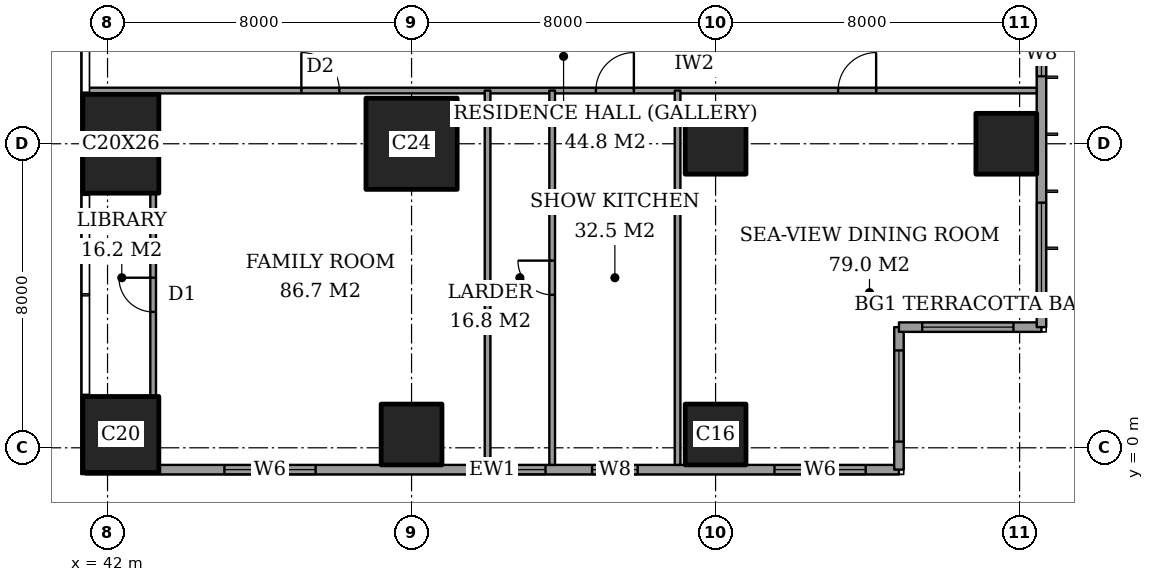
"""IFC4 building model, lengths in metres.
Left out: names, types, materials, properties, quantities, classifications, styles, units other than length and angle.
Written with IfcOpenShell. Run it as: python <this file> out.ifc"""

import sys

from ifc_helpers import new_model, si_unit, direction, frame, frame_2d, origin, origin_2d, place, context, subcontext, project, spatial, rectangle, extrude, element, fill, save


model = new_model("IFC4")
c1 = context("Model", 3, precision=1e-05, world=origin(), true_north=direction((0.0, 1.0)))
c2 = subcontext(c1, "Body", "Model", "MODEL_VIEW")
j1 = project(units=[si_unit("LENGTHUNIT", "METRE"), si_unit("PLANEANGLEUNIT", "RADIAN")], contexts=[c1])
p1 = place(None, origin())
s1 = spatial("IfcSite", under=j1, at=p1, CompositionType="ELEMENT")
p2 = place(p1, origin())
s2 = spatial("IfcBuilding", under=s1, at=p2, CompositionType="ELEMENT")
p3 = place(p2, frame((0.0, 0.0, 259.2)))
s3 = spatial("IfcBuildingStorey", under=s2, at=p3, CompositionType="ELEMENT", Elevation=259.2)
p4 = place(p3, frame((42.35, 0.35, 0.0), z_axis=(0.0, 0.0, 1.0), x_axis=(1.0, 0.0, 0.0)))
e1 = element("IfcColumn", 1, at=p4, inside=s3, PredefinedType="COLUMN", context=c2, shape_type="SweptSolid", body=[
    extrude(rectangle(XDim=2.0, YDim=2.0, at=origin_2d()), origin(), (0.0, 0.0, 1.0), 3.6),
])
p5 = place(p3, frame((42.35, 8.0, 0.0), z_axis=(0.0, 0.0, 1.0), x_axis=(1.0, 0.0, 0.0)))
e2 = element("IfcColumn", 2, at=p5, inside=s3, PredefinedType="COLUMN", context=c2, shape_type="SweptSolid", body=[
    extrude(rectangle(XDim=2.0, YDim=2.6, at=origin_2d()), origin(), (0.0, 0.0, 1.0), 3.6),
])
p6 = place(p3, frame((50.0, 0.35, 0.0), z_axis=(0.0, 0.0, 1.0), x_axis=(1.0, 0.0, 0.0)))
e3 = element("IfcColumn", 3, at=p6, inside=s3, PredefinedType="COLUMN", context=c2, shape_type="SweptSolid", body=[
    extrude(rectangle(XDim=1.6, YDim=1.6, at=origin_2d()), origin(), (0.0, 0.0, 1.0), 3.6),
])
p7 = place(p3, frame((50.0, 8.0, 0.0), z_axis=(0.0, 0.0, 1.0), x_axis=(1.0, 0.0, 0.0)))
e4 = element("IfcColumn", 4, at=p7, inside=s3, PredefinedType="COLUMN", context=c2, shape_type="SweptSolid", body=[
    extrude(rectangle(XDim=2.4, YDim=2.4, at=origin_2d()), origin(), (0.0, 0.0, 1.0), 3.6),
])
for number, where, z_axis, x_axis in (
    (5, (58.0, 0.35, 0.0), (0.0, 0.0, 1.0), (1.0, 0.0, 0.0)),
    (6, (58.0, 8.0, 0.0), (0.0, 0.0, 1.0), (1.0, 0.0, 0.0)),
    (7, (65.65, 8.0, 0.0), (0.0, 0.0, 1.0), (1.0, 0.0, 0.0)),
):
    element("IfcColumn", number, at=place(p3, frame(where, z_axis=z_axis, x_axis=x_axis)), inside=s3, PredefinedType="COLUMN", context=c2, shape_type="SweptSolid", body=[
        extrude(rectangle(XDim=1.6, YDim=1.6, at=origin_2d()), origin(), (0.0, 0.0, 1.0), 3.6),
    ])
p8 = place(p3, frame((41.425, -0.575, 0.0), z_axis=(0.0, 0.0, 1.0), x_axis=(1.0, 0.0, 0.0)))
e8 = element("IfcWall", 8, at=p8, inside=s3, PredefinedType="SOLIDWALL", context=c2, shape_type="SweptSolid", body=[
    extrude(rectangle(XDim=21.4, YDim=0.25, at=frame_2d((10.7, 0.0))), origin(), (0.0, 0.0, 1.0), 3.6),
])
p9 = place(p8, frame((3.65, 0.0, 0.6)))
e9 = element("IfcOpeningElement", 9, at=p9, cuts=e8, PredefinedType="OPENING", context=c2, shape_type="SweptSolid", body=[
    extrude(rectangle(XDim=2.4, YDim=2.0, at=frame_2d((1.2, 1.0))), frame((0.0, 0.135, 0.0), z_axis=(0.0, -1.0, 0.0), x_axis=(1.0, 0.0, 0.0)), (0.0, 0.0, 1.0), 0.27),
])
p10 = place(p8, frame((10.9, 0.0, 0.6)))
e10 = element("IfcOpeningElement", 10, at=p10, cuts=e8, PredefinedType="OPENING", context=c2, shape_type="SweptSolid", body=[
    extrude(rectangle(XDim=1.2, YDim=2.0, at=frame_2d((0.6, 1.0))), frame((0.0, 0.135, 0.0), z_axis=(0.0, -1.0, 0.0), x_axis=(1.0, 0.0, 0.0)), (0.0, 0.0, 1.0), 0.27),
])
p11 = place(p8, frame((13.325, 0.0, 0.6)))
e11 = element("IfcOpeningElement", 11, at=p11, cuts=e8, PredefinedType="OPENING", context=c2, shape_type="SweptSolid", body=[
    extrude(rectangle(XDim=1.2, YDim=2.0, at=frame_2d((0.6, 1.0))), frame((0.0, 0.135, 0.0), z_axis=(0.0, -1.0, 0.0), x_axis=(1.0, 0.0, 0.0)), (0.0, 0.0, 1.0), 0.27),
])
p12 = place(p8, frame((18.125, 0.0, 0.6)))
e12 = element("IfcOpeningElement", 12, at=p12, cuts=e8, PredefinedType="OPENING", context=c2, shape_type="SweptSolid", body=[
    extrude(rectangle(XDim=2.4, YDim=2.0, at=frame_2d((1.2, 1.0))), frame((0.0, 0.135, 0.0), z_axis=(0.0, -1.0, 0.0), x_axis=(1.0, 0.0, 0.0)), (0.0, 0.0, 1.0), 0.27),
])
p13 = place(p3, frame((62.825, -0.575, 0.0), z_axis=(0.0, 0.0, 1.0), x_axis=(0.0, 1.0, 0.0)))
e13 = element("IfcWall", 13, at=p13, inside=s3, PredefinedType="SOLIDWALL", context=c2, shape_type="SweptSolid", body=[
    extrude(rectangle(XDim=3.75, YDim=0.25, at=frame_2d((1.875, 0.0))), origin(), (0.0, 0.0, 1.0), 3.6),
])
p14 = place(p13, frame((0.738, 0.0, 0.6)))
e14 = element("IfcOpeningElement", 14, at=p14, cuts=e13, PredefinedType="OPENING", context=c2, shape_type="SweptSolid", body=[
    extrude(rectangle(XDim=2.4, YDim=2.0, at=frame_2d((1.2, 1.0))), frame((0.0, 0.135, 0.0), z_axis=(0.0, -1.0, 0.0), x_axis=(1.0, 0.0, 0.0)), (0.0, 0.0, 1.0), 0.27),
])
p15 = place(p3, frame((62.825, 3.175, 0.0), z_axis=(0.0, 0.0, 1.0), x_axis=(1.0, 0.0, 0.0)))
e15 = element("IfcWall", 15, at=p15, inside=s3, PredefinedType="SOLIDWALL", context=c2, shape_type="SweptSolid", body=[
    extrude(rectangle(XDim=3.75, YDim=0.25, at=frame_2d((1.875, 0.0))), origin(), (0.0, 0.0, 1.0), 3.6),
])
p16 = place(p15, frame((0.613, 0.0, 0.6)))
e16 = element("IfcOpeningElement", 16, at=p16, cuts=e15, PredefinedType="OPENING", context=c2, shape_type="SweptSolid", body=[
    extrude(rectangle(XDim=2.4, YDim=2.0, at=frame_2d((1.2, 1.0))), frame((0.0, 0.135, 0.0), z_axis=(0.0, -1.0, 0.0), x_axis=(1.0, 0.0, 0.0)), (0.0, 0.0, 1.0), 0.27),
])
p17 = place(p3, frame((66.575, 3.175, 0.0), z_axis=(0.0, 0.0, 1.0), x_axis=(0.0, 1.0, 0.0)))
e17 = element("IfcWall", 17, at=p17, inside=s3, PredefinedType="SOLIDWALL", context=c2, shape_type="SweptSolid", body=[
    extrude(rectangle(XDim=41.65, YDim=0.25, at=frame_2d((20.825, 0.0))), origin(), (0.0, 0.0, 1.0), 3.6),
])
p18 = place(p17, frame((0.875, 0.0, 0.6)))
e18 = element("IfcOpeningElement", 18, at=p18, cuts=e17, PredefinedType="OPENING", context=c2, shape_type="SweptSolid", body=[
    extrude(rectangle(XDim=2.4, YDim=2.0, at=frame_2d((1.2, 1.0))), frame((0.0, 0.135, 0.0), z_axis=(0.0, -1.0, 0.0), x_axis=(1.0, 0.0, 0.0)), (0.0, 0.0, 1.0), 0.27),
])
p19 = place(p17, frame((6.6, 0.0, 0.6)))
e19 = element("IfcOpeningElement", 19, at=p19, cuts=e17, PredefinedType="OPENING", context=c2, shape_type="SweptSolid", body=[
    extrude(rectangle(XDim=1.2, YDim=2.0, at=frame_2d((0.6, 1.0))), frame((0.0, 0.135, 0.0), z_axis=(0.0, -1.0, 0.0), x_axis=(1.0, 0.0, 0.0)), (0.0, 0.0, 1.0), 0.27),
])
p20 = place(p17, frame((8.825, 0.0, 0.6)))
e20 = element("IfcOpeningElement", 20, at=p20, cuts=e17, PredefinedType="OPENING", context=c2, shape_type="SweptSolid", body=[
    extrude(rectangle(XDim=2.4, YDim=2.0, at=frame_2d((1.2, 1.0))), frame((0.0, 0.135, 0.0), z_axis=(0.0, -1.0, 0.0), x_axis=(1.0, 0.0, 0.0)), (0.0, 0.0, 1.0), 0.27),
])
p21 = place(p17, frame((15.725, 0.0, 0.6)))
e21 = element("IfcOpeningElement", 21, at=p21, cuts=e17, PredefinedType="OPENING", context=c2, shape_type="SweptSolid", body=[
    extrude(rectangle(XDim=2.4, YDim=2.0, at=frame_2d((1.2, 1.0))), frame((0.0, 0.135, 0.0), z_axis=(0.0, -1.0, 0.0), x_axis=(1.0, 0.0, 0.0)), (0.0, 0.0, 1.0), 0.27),
])
p22 = place(p17, frame((23.625, 0.0, 0.6)))
e22 = element("IfcOpeningElement", 22, at=p22, cuts=e17, PredefinedType="OPENING", context=c2, shape_type="SweptSolid", body=[
    extrude(rectangle(XDim=2.4, YDim=2.0, at=frame_2d((1.2, 1.0))), frame((0.0, 0.135, 0.0), z_axis=(0.0, -1.0, 0.0), x_axis=(1.0, 0.0, 0.0)), (0.0, 0.0, 1.0), 0.27),
])
p23 = place(p17, frame((30.725, 0.0, 0.6)))
e23 = element("IfcOpeningElement", 23, at=p23, cuts=e17, PredefinedType="OPENING", context=c2, shape_type="SweptSolid", body=[
    extrude(rectangle(XDim=2.4, YDim=2.0, at=frame_2d((1.2, 1.0))), frame((0.0, 0.135, 0.0), z_axis=(0.0, -1.0, 0.0), x_axis=(1.0, 0.0, 0.0)), (0.0, 0.0, 1.0), 0.27),
])
p24 = place(p17, frame((34.525, 0.0, 0.6)))
e24 = element("IfcOpeningElement", 24, at=p24, cuts=e17, PredefinedType="OPENING", context=c2, shape_type="SweptSolid", body=[
    extrude(rectangle(XDim=1.2, YDim=2.0, at=frame_2d((0.6, 1.0))), frame((0.0, 0.135, 0.0), z_axis=(0.0, -1.0, 0.0), x_axis=(1.0, 0.0, 0.0)), (0.0, 0.0, 1.0), 0.27),
])
p25 = place(p17, frame((38.375, 0.0, 0.6)))
e25 = element("IfcOpeningElement", 25, at=p25, cuts=e17, PredefinedType="OPENING", context=c2, shape_type="SweptSolid", body=[
    extrude(rectangle(XDim=2.4, YDim=2.0, at=frame_2d((1.2, 1.0))), frame((0.0, 0.135, 0.0), z_axis=(0.0, -1.0, 0.0), x_axis=(1.0, 0.0, 0.0)), (0.0, 0.0, 1.0), 0.27),
])
p26 = place(p3, frame((41.439, 9.4, 0.0), z_axis=(0.0, 0.0, 1.0), x_axis=(1.0, 0.0, 0.0)))
e26 = element("IfcWall", 26, at=p26, inside=s3, PredefinedType="PARTITIONING", context=c2, shape_type="SweptSolid", body=[
    extrude(rectangle(XDim=25.011, YDim=0.15, at=frame_2d((12.505, 0.0))), origin(), (0.0, 0.0, 1.0), 3.35),
])
p27 = place(p26, frame((19.786, 0.0, 0.0)))
e27 = element("IfcOpeningElement", 27, at=p27, cuts=e26, PredefinedType="OPENING", context=c2, shape_type="SweptSolid", body=[
    extrude(rectangle(XDim=1.0, YDim=2.1, at=frame_2d((0.5, 1.05))), frame((0.0, 0.085, 0.0), z_axis=(0.0, -1.0, 0.0), x_axis=(1.0, 0.0, 0.0)), (0.0, 0.0, 1.0), 0.17),
])
p28 = place(p26, frame((13.411, 0.0, 0.0)))
e28 = element("IfcOpeningElement", 28, at=p28, cuts=e26, PredefinedType="OPENING", context=c2, shape_type="SweptSolid", body=[
    extrude(rectangle(XDim=1.0, YDim=2.1, at=frame_2d((0.5, 1.05))), frame((0.0, 0.085, 0.0), z_axis=(0.0, -1.0, 0.0), x_axis=(1.0, 0.0, 0.0)), (0.0, 0.0, 1.0), 0.17),
])
p29 = place(p26, frame((5.661, 0.0, 0.0)))
e29 = element("IfcOpeningElement", 29, at=p29, cuts=e26, PredefinedType="OPENING", context=c2, shape_type="SweptSolid", body=[
    extrude(rectangle(XDim=1.0, YDim=2.1, at=frame_2d((0.5, 1.05))), frame((0.0, 0.085, 0.0), z_axis=(0.0, -1.0, 0.0), x_axis=(1.0, 0.0, 0.0)), (0.0, 0.0, 1.0), 0.17),
])
p30 = place(p3, frame((43.2, 1.35, 0.0), z_axis=(0.0, 0.0, 1.0), x_axis=(0.0, 1.0, 0.0)))
e30 = element("IfcWall", 30, at=p30, inside=s3, PredefinedType="PARTITIONING", context=c2, shape_type="SweptSolid", body=[
    extrude(rectangle(XDim=5.35, YDim=0.15, at=frame_2d((2.675, 0.0))), origin(), (0.0, 0.0, 1.0), 3.35),
])
p31 = place(p30, frame((2.225, 0.0, 0.0)))
e31 = element("IfcOpeningElement", 31, at=p31, cuts=e30, PredefinedType="OPENING", context=c2, shape_type="SweptSolid", body=[
    extrude(rectangle(XDim=0.9, YDim=2.1, at=frame_2d((0.45, 1.05))), frame((0.0, 0.085, 0.0), z_axis=(0.0, -1.0, 0.0), x_axis=(1.0, 0.0, 0.0)), (0.0, 0.0, 1.0), 0.17),
])
p32 = place(p3, frame((52.0, -0.45, 0.0), z_axis=(0.0, 0.0, 1.0), x_axis=(0.0, 1.0, 0.0)))
e32 = element("IfcWall", 32, at=p32, inside=s3, PredefinedType="PARTITIONING", context=c2, shape_type="SweptSolid", body=[
    extrude(rectangle(XDim=9.85, YDim=0.15, at=frame_2d((4.925, 0.0))), origin(), (0.0, 0.0, 1.0), 3.35),
])
p33 = place(p3, frame((53.7, -0.45, 0.0), z_axis=(0.0, 0.0, 1.0), x_axis=(0.0, 1.0, 0.0)))
e33 = element("IfcWall", 33, at=p33, inside=s3, PredefinedType="PARTITIONING", context=c2, shape_type="SweptSolid", body=[
    extrude(rectangle(XDim=9.85, YDim=0.15, at=frame_2d((4.925, 0.0))), origin(), (0.0, 0.0, 1.0), 3.35),
])
p34 = place(p33, frame((4.475, 0.0, 0.0)))
e34 = element("IfcOpeningElement", 34, at=p34, cuts=e33, PredefinedType="OPENING", context=c2, shape_type="SweptSolid", body=[
    extrude(rectangle(XDim=0.9, YDim=2.1, at=frame_2d((0.45, 1.05))), frame((0.0, 0.085, 0.0), z_axis=(0.0, -1.0, 0.0), x_axis=(1.0, 0.0, 0.0)), (0.0, 0.0, 1.0), 0.17),
])
p35 = place(p3, frame((57.0, -0.45, 0.0), z_axis=(0.0, 0.0, 1.0), x_axis=(0.0, 1.0, 0.0)))
e35 = element("IfcWall", 35, at=p35, inside=s3, PredefinedType="PARTITIONING", context=c2, shape_type="SweptSolid", body=[
    extrude(rectangle(XDim=9.85, YDim=0.15, at=frame_2d((4.925, 0.0))), origin(), (0.0, 0.0, 1.0), 3.35),
])
p36 = place(p9, origin())
e36 = element("IfcWindow", 36, at=p36, inside=s3, PartitioningType="SINGLE_PANEL", PredefinedType="WINDOW", context=c2, shape_type="SweptSolid", body=[
    extrude(rectangle(XDim=2.4, YDim=2.0, at=frame_2d((1.2, 1.0))), frame((0.0, 0.03, 0.0), z_axis=(0.0, -1.0, 0.0), x_axis=(1.0, 0.0, 0.0)), (0.0, 0.0, 1.0), 0.06),
])
fill(e9, e36)
p37 = place(p10, origin())
e37 = element("IfcWindow", 37, at=p37, inside=s3, PartitioningType="SINGLE_PANEL", PredefinedType="WINDOW", context=c2, shape_type="SweptSolid", body=[
    extrude(rectangle(XDim=1.2, YDim=2.0, at=frame_2d((0.6, 1.0))), frame((0.0, 0.03, 0.0), z_axis=(0.0, -1.0, 0.0), x_axis=(1.0, 0.0, 0.0)), (0.0, 0.0, 1.0), 0.06),
])
fill(e10, e37)
p38 = place(p11, origin())
e38 = element("IfcWindow", 38, at=p38, inside=s3, PartitioningType="SINGLE_PANEL", PredefinedType="WINDOW", context=c2, shape_type="SweptSolid", body=[
    extrude(rectangle(XDim=1.2, YDim=2.0, at=frame_2d((0.6, 1.0))), frame((0.0, 0.03, 0.0), z_axis=(0.0, -1.0, 0.0), x_axis=(1.0, 0.0, 0.0)), (0.0, 0.0, 1.0), 0.06),
])
fill(e11, e38)
p39 = place(p12, origin())
e39 = element("IfcWindow", 39, at=p39, inside=s3, PartitioningType="SINGLE_PANEL", PredefinedType="WINDOW", context=c2, shape_type="SweptSolid", body=[
    extrude(rectangle(XDim=2.4, YDim=2.0, at=frame_2d((1.2, 1.0))), frame((0.0, 0.03, 0.0), z_axis=(0.0, -1.0, 0.0), x_axis=(1.0, 0.0, 0.0)), (0.0, 0.0, 1.0), 0.06),
])
fill(e12, e39)
p40 = place(p14, origin())
e40 = element("IfcWindow", 40, at=p40, inside=s3, PartitioningType="SINGLE_PANEL", PredefinedType="WINDOW", context=c2, shape_type="SweptSolid", body=[
    extrude(rectangle(XDim=2.4, YDim=2.0, at=frame_2d((1.2, 1.0))), frame((0.0, 0.03, 0.0), z_axis=(0.0, -1.0, 0.0), x_axis=(1.0, 0.0, 0.0)), (0.0, 0.0, 1.0), 0.06),
])
fill(e14, e40)
p41 = place(p16, origin())
e41 = element("IfcWindow", 41, at=p41, inside=s3, PartitioningType="SINGLE_PANEL", PredefinedType="WINDOW", context=c2, shape_type="SweptSolid", body=[
    extrude(rectangle(XDim=2.4, YDim=2.0, at=frame_2d((1.2, 1.0))), frame((0.0, 0.03, 0.0), z_axis=(0.0, -1.0, 0.0), x_axis=(1.0, 0.0, 0.0)), (0.0, 0.0, 1.0), 0.06),
])
fill(e16, e41)
p42 = place(p18, origin())
e42 = element("IfcWindow", 42, at=p42, inside=s3, PartitioningType="SINGLE_PANEL", PredefinedType="WINDOW", context=c2, shape_type="SweptSolid", body=[
    extrude(rectangle(XDim=2.4, YDim=2.0, at=frame_2d((1.2, 1.0))), frame((0.0, 0.03, 0.0), z_axis=(0.0, -1.0, 0.0), x_axis=(1.0, 0.0, 0.0)), (0.0, 0.0, 1.0), 0.06),
])
fill(e18, e42)
p43 = place(p19, origin())
e43 = element("IfcWindow", 43, at=p43, inside=s3, PartitioningType="SINGLE_PANEL", PredefinedType="WINDOW", context=c2, shape_type="SweptSolid", body=[
    extrude(rectangle(XDim=1.2, YDim=2.0, at=frame_2d((0.6, 1.0))), frame((0.0, 0.03, 0.0), z_axis=(0.0, -1.0, 0.0), x_axis=(1.0, 0.0, 0.0)), (0.0, 0.0, 1.0), 0.06),
])
fill(e19, e43)
p44 = place(p27, origin())
e44 = element("IfcDoor", 44, at=p44, inside=s3, OperationType="SINGLE_SWING_LEFT", PredefinedType="DOOR", context=c2, shape_type="SweptSolid", body=[
    extrude(rectangle(XDim=1.0, YDim=2.1, at=frame_2d((0.5, 1.05))), frame((0.0, 0.025, 0.0), z_axis=(0.0, -1.0, 0.0), x_axis=(1.0, 0.0, 0.0)), (0.0, 0.0, 1.0), 0.05),
])
fill(e27, e44)
p45 = place(p28, origin())
e45 = element("IfcDoor", 45, at=p45, inside=s3, OperationType="SINGLE_SWING_LEFT", PredefinedType="DOOR", context=c2, shape_type="SweptSolid", body=[
    extrude(rectangle(XDim=1.0, YDim=2.1, at=frame_2d((0.5, 1.05))), frame((0.0, 0.025, 0.0), z_axis=(0.0, -1.0, 0.0), x_axis=(1.0, 0.0, 0.0)), (0.0, 0.0, 1.0), 0.05),
])
fill(e28, e45)
p46 = place(p34, origin())
e46 = element("IfcDoor", 46, at=p46, inside=s3, OperationType="SINGLE_SWING_LEFT", PredefinedType="DOOR", context=c2, shape_type="SweptSolid", body=[
    extrude(rectangle(XDim=0.9, YDim=2.1, at=frame_2d((0.45, 1.05))), frame((0.0, 0.025, 0.0), z_axis=(0.0, -1.0, 0.0), x_axis=(1.0, 0.0, 0.0)), (0.0, 0.0, 1.0), 0.05),
])
fill(e34, e46)
p47 = place(p29, origin())
e47 = element("IfcDoor", 47, at=p47, inside=s3, OperationType="SINGLE_SWING_RIGHT", PredefinedType="DOOR", context=c2, shape_type="SweptSolid", body=[
    extrude(rectangle(XDim=1.0, YDim=2.1, at=frame_2d((0.5, 1.05))), frame((0.0, 0.025, 0.0), z_axis=(0.0, -1.0, 0.0), x_axis=(1.0, 0.0, 0.0)), (0.0, 0.0, 1.0), 0.05),
])
fill(e29, e47)
p48 = place(p31, origin())
e48 = element("IfcDoor", 48, at=p48, inside=s3, OperationType="SINGLE_SWING_LEFT", PredefinedType="DOOR", context=c2, shape_type="SweptSolid", body=[
    extrude(rectangle(XDim=0.9, YDim=2.1, at=frame_2d((0.45, 1.05))), frame((0.0, 0.025, 0.0), z_axis=(0.0, -1.0, 0.0), x_axis=(1.0, 0.0, 0.0)), (0.0, 0.0, 1.0), 0.05),
])
fill(e31, e48)
save(model, sys.argv[1])
